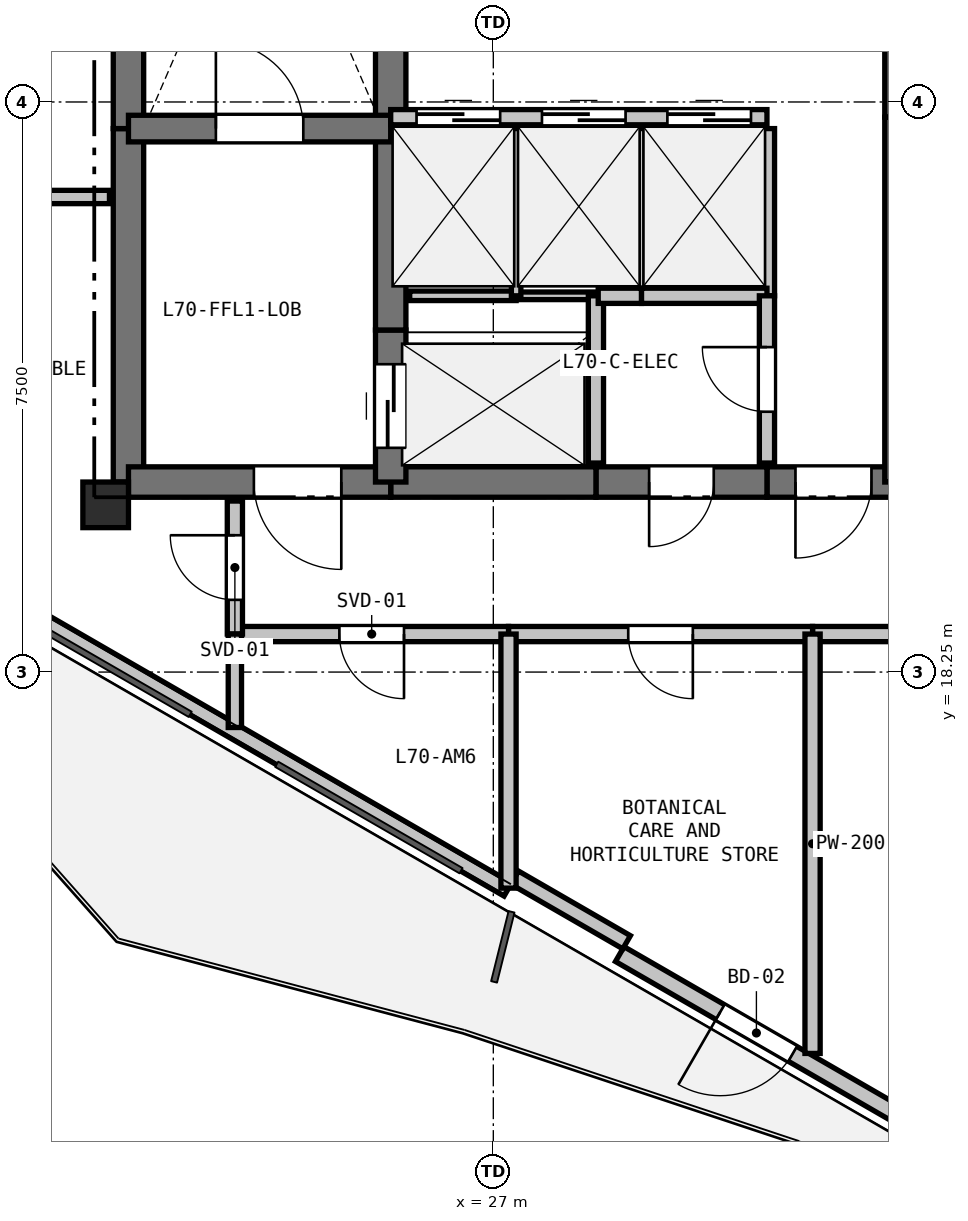
"""IFC4 building model, lengths in metres.
Left out: names, types, materials, properties, quantities, classifications, styles, units other than length and angle.
Written with IfcOpenShell. Run it as: python <this file> out.ifc"""

import sys

from ifc_helpers import new_model, si_unit, direction, frame, frame_2d, origin, origin_2d, place, context, subcontext, project, spatial, rectangle, extrude, element, fill, save


model = new_model("IFC4")
c1 = context("Model", 3, precision=1e-05, world=origin(), true_north=direction((0.0, 1.0)))
c2 = subcontext(c1, "Body", "Model", "MODEL_VIEW")
j1 = project(units=[si_unit("LENGTHUNIT", "METRE"), si_unit("PLANEANGLEUNIT", "RADIAN")], contexts=[c1])
p1 = place(None, origin())
s1 = spatial("IfcSite", under=j1, at=p1, CompositionType="ELEMENT")
p2 = place(p1, origin())
s2 = spatial("IfcBuilding", under=s1, at=p2, CompositionType="ELEMENT")
p3 = place(p2, frame((0.0, 0.0, 249.6)))
s3 = spatial("IfcBuildingStorey", under=s2, at=p3, CompositionType="ELEMENT", Elevation=249.6)
p4 = place(p3, frame((21.9, 20.45, 0.0), z_axis=(0.0, 0.0, 1.0), x_axis=(1.0, 0.0, 0.0)))
e1 = element("IfcColumn", 1, at=p4, inside=s3, PredefinedType="COLUMN", context=c2, shape_type="SweptSolid", body=[
    extrude(rectangle(XDim=0.6, YDim=0.6, at=origin_2d()), origin(), (0.0, 0.0, 1.0), 4.5),
])
p5 = place(p3, frame((36.395, 10.076, 0.0), z_axis=(0.0, 0.0, 1.0), x_axis=(-0.866026655105, 0.499997832642, 0.0)))
e2 = element("IfcWall", 2, at=p5, inside=s3, PredefinedType="SOLIDWALL", context=c2, shape_type="SweptSolid", body=[
    extrude(rectangle(XDim=8.928, YDim=0.225, at=frame_2d((4.464, 0.0))), origin(), (0.0, 0.0, 1.0), 3.84),
])
p6 = place(p5, frame((6.302, 0.0, 0.0)))
e3 = element("IfcOpeningElement", 3, at=p6, cuts=e2, PredefinedType="OPENING", context=c2, shape_type="SweptSolid", body=[
    extrude(rectangle(XDim=1.1, YDim=2.1, at=frame_2d((0.55, 1.05))), frame((0.0, 0.123, 0.0), z_axis=(0.0, -1.0, 0.0), x_axis=(1.0, 0.0, 0.0)), (0.0, 0.0, 1.0), 0.245),
])
p7 = place(p3, frame((27.191, 15.389, 0.0), z_axis=(0.0, 0.0, 1.0), x_axis=(-0.866019557082, 0.500010126649, 0.0)))
e4 = element("IfcWall", 4, at=p7, inside=s3, PredefinedType="PARAPET", context=c2, shape_type="SweptSolid", body=[
    extrude(rectangle(XDim=8.228, YDim=0.2, at=frame_2d((4.114, 0.0))), origin(), (0.0, 0.0, 1.0), 0.2),
])
p8 = place(p3, frame((28.754, 14.695, 0.0), z_axis=(0.0, 0.0, 1.0), x_axis=(-0.866025371046, 0.500000056704, 0.0)))
e5 = element("IfcWall", 5, at=p8, inside=s3, PredefinedType="PARAPET", context=c2, shape_type="SweptSolid", body=[
    extrude(rectangle(XDim=1.7, YDim=0.2, at=frame_2d((0.85, 0.0))), origin(), (0.0, 0.0, 1.0), 3.84),
])
p9 = place(p3, frame((22.2, 20.75, 0.0), z_axis=(0.0, 0.0, 1.0), x_axis=(0.0, 1.0, 0.0)))
e6 = element("IfcWall", 6, at=p9, inside=s3, PredefinedType="SHEAR", context=c2, shape_type="SweptSolid", body=[
    extrude(rectangle(XDim=4.65, YDim=0.4, at=frame_2d((2.325, 0.0))), origin(), (0.0, 0.0, 1.0), 4.22),
])
p10 = place(p3, frame((22.2, 25.4, 0.0), z_axis=(0.0, 0.0, 1.0), x_axis=(0.0, 1.0, 0.0)))
e7 = element("IfcWall", 7, at=p10, inside=s3, PredefinedType="SHEAR", context=c2, shape_type="SweptSolid", body=[
    extrude(rectangle(XDim=7.35, YDim=0.4, at=frame_2d((3.675, 0.0))), origin(), (0.0, 0.0, 1.0), 4.22),
])
p11 = place(p3, frame((32.35, 20.75, 0.0), z_axis=(0.0, 0.0, 1.0), x_axis=(-1.0, 0.0, 0.0)))
e8 = element("IfcWall", 8, at=p11, inside=s3, PredefinedType="SHEAR", context=c2, shape_type="SweptSolid", body=[
    extrude(rectangle(XDim=1.75, YDim=0.4, at=frame_2d((0.875, 0.0))), origin(), (0.0, 0.0, 1.0), 4.22),
])
p12 = place(p11, frame((0.375, 0.0, 0.0)))
e9 = element("IfcOpeningElement", 9, at=p12, cuts=e8, PredefinedType="OPENING", context=c2, shape_type="SweptSolid", body=[
    extrude(rectangle(XDim=1.0, YDim=2.15, at=frame_2d((0.5, 1.075))), frame((0.0, 0.21, 0.0), z_axis=(0.0, -1.0, 0.0), x_axis=(1.0, 0.0, 0.0)), (0.0, 0.0, 1.0), 0.42),
])
p13 = place(p3, frame((30.6, 20.75, 0.0), z_axis=(0.0, 0.0, 1.0), x_axis=(-1.0, 0.0, 0.0)))
e10 = element("IfcWall", 10, at=p13, inside=s3, PredefinedType="SHEAR", context=c2, shape_type="SweptSolid", body=[
    extrude(rectangle(XDim=2.25, YDim=0.4, at=frame_2d((1.125, 0.0))), origin(), (0.0, 0.0, 1.0), 4.22),
])
p14 = place(p13, frame((0.7, 0.0, 0.0)))
e11 = element("IfcOpeningElement", 11, at=p14, cuts=e10, PredefinedType="OPENING", context=c2, shape_type="SweptSolid", body=[
    extrude(rectangle(XDim=0.85, YDim=2.1, at=frame_2d((0.425, 1.05))), frame((0.0, 0.21, 0.0), z_axis=(0.0, -1.0, 0.0), x_axis=(1.0, 0.0, 0.0)), (0.0, 0.0, 1.0), 0.42),
])
p15 = place(p3, frame((28.35, 20.75, 0.0), z_axis=(0.0, 0.0, 1.0), x_axis=(-1.0, 0.0, 0.0)))
e12 = element("IfcWall", 12, at=p15, inside=s3, PredefinedType="SHEAR", context=c2, shape_type="SweptSolid", body=[
    extrude(rectangle(XDim=2.7, YDim=0.4, at=frame_2d((1.35, 0.0))), origin(), (0.0, 0.0, 1.0), 4.22),
])
p16 = place(p3, frame((25.65, 20.75, 0.0), z_axis=(0.0, 0.0, 1.0), x_axis=(-1.0, 0.0, 0.0)))
e13 = element("IfcWall", 13, at=p16, inside=s3, PredefinedType="SHEAR", context=c2, shape_type="SweptSolid", body=[
    extrude(rectangle(XDim=3.45, YDim=0.4, at=frame_2d((1.725, 0.0))), origin(), (0.0, 0.0, 1.0), 4.22),
])
p17 = place(p16, frame((0.65, 0.0, 0.0)))
e14 = element("IfcOpeningElement", 14, at=p17, cuts=e13, PredefinedType="OPENING", context=c2, shape_type="SweptSolid", body=[
    extrude(rectangle(XDim=1.15, YDim=2.15, at=frame_2d((0.575, 1.075))), frame((0.0, 0.21, 0.0), z_axis=(0.0, -1.0, 0.0), x_axis=(1.0, 0.0, 0.0)), (0.0, 0.0, 1.0), 0.42),
])
p18 = place(p3, frame((25.65, 20.75, 0.0), z_axis=(0.0, 0.0, 1.0), x_axis=(0.0, 1.0, 0.0)))
e15 = element("IfcWall", 15, at=p18, inside=s3, PredefinedType="SHEAR", context=c2, shape_type="SweptSolid", body=[
    extrude(rectangle(XDim=2.0, YDim=0.4, at=frame_2d((1.0, 0.0))), origin(), (0.0, 0.0, 1.0), 4.22),
])
p19 = place(p18, frame((0.45, 0.0, 0.0)))
e16 = element("IfcOpeningElement", 16, at=p19, cuts=e15, PredefinedType="OPENING", context=c2, shape_type="SweptSolid", body=[
    extrude(rectangle(XDim=1.1, YDim=2.15, at=frame_2d((0.55, 1.075))), frame((0.0, 0.21, 0.0), z_axis=(0.0, -1.0, 0.0), x_axis=(1.0, 0.0, 0.0)), (0.0, 0.0, 1.0), 0.42),
])
p20 = place(p3, frame((25.65, 22.75, 0.0), z_axis=(0.0, 0.0, 1.0), x_axis=(0.0, 1.0, 0.0)))
e17 = element("IfcWall", 17, at=p20, inside=s3, PredefinedType="SHEAR", context=c2, shape_type="SweptSolid", body=[
    extrude(rectangle(XDim=2.8, YDim=0.4, at=frame_2d((1.4, 0.0))), origin(), (0.0, 0.0, 1.0), 4.22),
])
p21 = place(p3, frame((25.65, 25.55, 0.0), z_axis=(0.0, 0.0, 1.0), x_axis=(0.0, 1.0, 0.0)))
e18 = element("IfcWall", 18, at=p21, inside=s3, PredefinedType="SHEAR", context=c2, shape_type="SweptSolid", body=[
    extrude(rectangle(XDim=2.4, YDim=0.4, at=frame_2d((1.2, 0.0))), origin(), (0.0, 0.0, 1.0), 4.22),
])
p22 = place(p3, frame((32.35, 20.75, 0.0), z_axis=(0.0, 0.0, 1.0), x_axis=(0.0, 1.0, 0.0)))
e19 = element("IfcWall", 19, at=p22, inside=s3, PredefinedType="SHEAR", context=c2, shape_type="SweptSolid", body=[
    extrude(rectangle(XDim=4.8, YDim=0.4, at=frame_2d((2.4, 0.0))), origin(), (0.0, 0.0, 1.0), 4.22),
])
p23 = place(p3, frame((32.35, 25.55, 0.0), z_axis=(0.0, 0.0, 1.0), x_axis=(0.0, 1.0, 0.0)))
e20 = element("IfcWall", 20, at=p23, inside=s3, PredefinedType="SHEAR", context=c2, shape_type="SweptSolid", body=[
    extrude(rectangle(XDim=2.4, YDim=0.4, at=frame_2d((1.2, 0.0))), origin(), (0.0, 0.0, 1.0), 4.22),
])
p24 = place(p3, frame((22.2, 25.4, 0.0), z_axis=(0.0, 0.0, 1.0), x_axis=(1.0, 0.0, 0.0)))
e21 = element("IfcWall", 21, at=p24, inside=s3, PredefinedType="SHEAR", context=c2, shape_type="SweptSolid", body=[
    extrude(rectangle(XDim=3.45, YDim=0.35, at=frame_2d((1.725, 0.0))), origin(), (0.0, 0.0, 1.0), 4.22),
])
p25 = place(p24, frame((1.15, 0.0, 0.0)))
e22 = element("IfcOpeningElement", 22, at=p25, cuts=e21, PredefinedType="OPENING", context=c2, shape_type="SweptSolid", body=[
    extrude(rectangle(XDim=1.15, YDim=2.15, at=frame_2d((0.575, 1.075))), frame((0.0, 0.185, 0.0), z_axis=(0.0, -1.0, 0.0), x_axis=(1.0, 0.0, 0.0)), (0.0, 0.0, 1.0), 0.37),
])
p26 = place(p3, frame((25.65, 25.55, 0.0), z_axis=(0.0, 0.0, 1.0), x_axis=(1.0, 0.0, 0.0)))
e23 = element("IfcWall", 23, at=p26, inside=s3, PredefinedType="PARTITIONING", context=c2, shape_type="SweptSolid", body=[
    extrude(rectangle(XDim=4.95, YDim=0.2, at=frame_2d((2.475, 0.0))), origin(), (0.0, 0.0, 1.0), 4.22),
])
p27 = place(p26, frame((0.34, 0.0, 0.0)))
e24 = element("IfcOpeningElement", 24, at=p27, cuts=e23, PredefinedType="OPENING", context=c2, shape_type="SweptSolid", body=[
    extrude(rectangle(XDim=1.1, YDim=2.15, at=frame_2d((0.55, 1.075))), frame((0.0, 0.11, 0.0), z_axis=(0.0, -1.0, 0.0), x_axis=(1.0, 0.0, 0.0)), (0.0, 0.0, 1.0), 0.22),
])
p28 = place(p26, frame((1.99, 0.0, 0.0)))
e25 = element("IfcOpeningElement", 25, at=p28, cuts=e23, PredefinedType="OPENING", context=c2, shape_type="SweptSolid", body=[
    extrude(rectangle(XDim=1.1, YDim=2.15, at=frame_2d((0.55, 1.075))), frame((0.0, 0.11, 0.0), z_axis=(0.0, -1.0, 0.0), x_axis=(1.0, 0.0, 0.0)), (0.0, 0.0, 1.0), 0.22),
])
p29 = place(p26, frame((3.64, 0.0, 0.0)))
e26 = element("IfcOpeningElement", 26, at=p29, cuts=e23, PredefinedType="OPENING", context=c2, shape_type="SweptSolid", body=[
    extrude(rectangle(XDim=1.1, YDim=2.15, at=frame_2d((0.55, 1.075))), frame((0.0, 0.11, 0.0), z_axis=(0.0, -1.0, 0.0), x_axis=(1.0, 0.0, 0.0)), (0.0, 0.0, 1.0), 0.22),
])
p30 = place(p3, frame((25.9, 23.2, 0.0), z_axis=(0.0, 0.0, 1.0), x_axis=(1.0, 0.0, 0.0)))
e27 = element("IfcWall", 27, at=p30, inside=s3, PredefinedType="PARTITIONING", context=c2, shape_type="SweptSolid", body=[
    extrude(rectangle(XDim=1.4, YDim=0.125, at=frame_2d((0.7, 0.0))), origin(), (0.0, 0.0, 1.0), 4.22),
])
p31 = place(p3, frame((27.3, 23.2, 0.0), z_axis=(0.0, 0.0, 1.0), x_axis=(1.0, 0.0, 0.0)))
e28 = element("IfcWall", 28, at=p31, inside=s3, PredefinedType="PARTITIONING", context=c2, shape_type="SweptSolid", body=[
    extrude(rectangle(XDim=1.05, YDim=0.1, at=frame_2d((0.525, 0.0))), origin(), (0.0, 0.0, 1.0), 4.22),
])
p32 = place(p3, frame((28.35, 23.2, 0.0), z_axis=(0.0, 0.0, 1.0), x_axis=(0.0, -1.0, 0.0)))
e29 = element("IfcWall", 29, at=p32, inside=s3, PredefinedType="PARTITIONING", context=c2, shape_type="SweptSolid", body=[
    extrude(rectangle(XDim=2.2, YDim=0.2, at=frame_2d((1.1, 0.0))), origin(), (0.0, 0.0, 1.0), 4.22),
])
p33 = place(p3, frame((27.3, 25.4, 0.0), z_axis=(0.0, 0.0, 1.0), x_axis=(0.0, -1.0, 0.0)))
e30 = element("IfcWall", 30, at=p33, inside=s3, PredefinedType="PARTITIONING", context=c2, shape_type="SweptSolid", body=[
    extrude(rectangle(XDim=2.2, YDim=0.125, at=frame_2d((1.1, 0.0))), origin(), (0.0, 0.0, 1.0), 4.22),
])
p34 = place(p3, frame((28.95, 25.4, 0.0), z_axis=(0.0, 0.0, 1.0), x_axis=(0.0, -1.0, 0.0)))
e31 = element("IfcWall", 31, at=p34, inside=s3, PredefinedType="PARTITIONING", context=c2, shape_type="SweptSolid", body=[
    extrude(rectangle(XDim=2.2, YDim=0.1, at=frame_2d((1.1, 0.0))), origin(), (0.0, 0.0, 1.0), 4.22),
])
p35 = place(p3, frame((28.95, 23.2, 0.0), z_axis=(0.0, 0.0, 1.0), x_axis=(-1.0, 0.0, 0.0)))
e32 = element("IfcWall", 32, at=p35, inside=s3, PredefinedType="PARTITIONING", context=c2, shape_type="SweptSolid", body=[
    extrude(rectangle(XDim=0.57, YDim=0.2, at=frame_2d((0.285, 0.0))), origin(), (0.0, 0.0, 1.0), 4.22),
])
p36 = place(p3, frame((30.6, 25.4, 0.0), z_axis=(0.0, 0.0, 1.0), x_axis=(0.0, -1.0, 0.0)))
e33 = element("IfcWall", 33, at=p36, inside=s3, PredefinedType="PARTITIONING", context=c2, shape_type="SweptSolid", body=[
    extrude(rectangle(XDim=2.2, YDim=0.2, at=frame_2d((1.1, 0.0))), origin(), (0.0, 0.0, 1.0), 4.22),
])
p37 = place(p3, frame((30.6, 23.2, 0.0), z_axis=(0.0, 0.0, 1.0), x_axis=(-1.0, 0.0, 0.0)))
e34 = element("IfcWall", 34, at=p37, inside=s3, PredefinedType="PARTITIONING", context=c2, shape_type="SweptSolid", body=[
    extrude(rectangle(XDim=1.65, YDim=0.2, at=frame_2d((0.825, 0.0))), origin(), (0.0, 0.0, 1.0), 4.22),
])
p38 = place(p3, frame((30.6, 21.0, 0.0), z_axis=(0.0, 0.0, 1.0), x_axis=(0.0, 1.0, 0.0)))
e35 = element("IfcWall", 35, at=p38, inside=s3, PredefinedType="PARTITIONING", context=c2, shape_type="SweptSolid", body=[
    extrude(rectangle(XDim=2.2, YDim=0.2, at=frame_2d((1.1, 0.0))), origin(), (0.0, 0.0, 1.0), 4.22),
])
p39 = place(p38, frame((0.675, 0.0, 0.0)))
e36 = element("IfcOpeningElement", 36, at=p39, cuts=e35, PredefinedType="OPENING", context=c2, shape_type="SweptSolid", body=[
    extrude(rectangle(XDim=0.85, YDim=2.1, at=frame_2d((0.425, 1.05))), frame((0.0, 0.11, 0.0), z_axis=(0.0, -1.0, 0.0), x_axis=(1.0, 0.0, 0.0)), (0.0, 0.0, 1.0), 0.22),
])
p40 = place(p3, frame((38.45, 18.75, 0.0), z_axis=(0.0, 0.0, 1.0), x_axis=(-1.0, 0.0, 0.0)))
e37 = element("IfcWall", 37, at=p40, inside=s3, PredefinedType="PARTITIONING", context=c2, shape_type="SweptSolid", body=[
    extrude(rectangle(XDim=7.25, YDim=0.2, at=frame_2d((3.625, 0.0))), origin(), (0.0, 0.0, 1.0), 3.668),
])
p41 = place(p40, frame((3.125, 0.0, 0.0)))
e38 = element("IfcOpeningElement", 38, at=p41, cuts=e37, PredefinedType="OPENING", context=c2, shape_type="SweptSolid", body=[
    extrude(rectangle(XDim=1.0, YDim=2.15, at=frame_2d((0.5, 1.075))), frame((0.0, 0.11, 0.0), z_axis=(0.0, -1.0, 0.0), x_axis=(1.0, 0.0, 0.0)), (0.0, 0.0, 1.0), 0.22),
])
p42 = place(p3, frame((31.2, 18.75, 0.0), z_axis=(0.0, 0.0, 1.0), x_axis=(-1.0, 0.0, 0.0)))
e39 = element("IfcWall", 39, at=p42, inside=s3, PredefinedType="PARTITIONING", context=c2, shape_type="SweptSolid", body=[
    extrude(rectangle(XDim=4.0, YDim=0.2, at=frame_2d((2.0, 0.0))), origin(), (0.0, 0.0, 1.0), 4.22),
])
p43 = place(p42, frame((1.575, 0.0, 0.0)))
e40 = element("IfcOpeningElement", 40, at=p43, cuts=e39, PredefinedType="OPENING", context=c2, shape_type="SweptSolid", body=[
    extrude(rectangle(XDim=0.85, YDim=2.1, at=frame_2d((0.425, 1.05))), frame((0.0, 0.11, 0.0), z_axis=(0.0, -1.0, 0.0), x_axis=(1.0, 0.0, 0.0)), (0.0, 0.0, 1.0), 0.22),
])
p44 = place(p3, frame((27.2, 18.75, 0.0), z_axis=(0.0, 0.0, 1.0), x_axis=(-1.0, 0.0, 0.0)))
e41 = element("IfcWall", 41, at=p44, inside=s3, PredefinedType="PARTITIONING", context=c2, shape_type="SweptSolid", body=[
    extrude(rectangle(XDim=3.6, YDim=0.2, at=frame_2d((1.8, 0.0))), origin(), (0.0, 0.0, 1.0), 3.668),
])
p45 = place(p44, frame((1.375, 0.0, 0.0)))
e42 = element("IfcOpeningElement", 42, at=p45, cuts=e41, PredefinedType="OPENING", context=c2, shape_type="SweptSolid", body=[
    extrude(rectangle(XDim=0.85, YDim=2.1, at=frame_2d((0.425, 1.05))), frame((0.0, 0.11, 0.0), z_axis=(0.0, -1.0, 0.0), x_axis=(1.0, 0.0, 0.0)), (0.0, 0.0, 1.0), 0.22),
])
p46 = place(p3, frame((23.6, 18.75, 0.0), z_axis=(0.0, 0.0, 1.0), x_axis=(0.0, 1.0, 0.0)))
e43 = element("IfcWall", 43, at=p46, inside=s3, PredefinedType="PARTITIONING", context=c2, shape_type="SweptSolid", body=[
    extrude(rectangle(XDim=1.75, YDim=0.2, at=frame_2d((0.875, 0.0))), origin(), (0.0, 0.0, 1.0), 3.668),
])
p47 = place(p46, frame((0.45, 0.0, 0.0)))
e44 = element("IfcOpeningElement", 44, at=p47, cuts=e43, PredefinedType="OPENING", context=c2, shape_type="SweptSolid", body=[
    extrude(rectangle(XDim=0.85, YDim=2.1, at=frame_2d((0.425, 1.05))), frame((0.0, 0.11, 0.0), z_axis=(0.0, -1.0, 0.0), x_axis=(1.0, 0.0, 0.0)), (0.0, 0.0, 1.0), 0.22),
])
p48 = place(p3, frame((27.2, 18.75, 0.0), z_axis=(0.0, 0.0, 1.0), x_axis=(0.0, -1.0, 0.0)))
e45 = element("IfcWall", 45, at=p48, inside=s3, PredefinedType="PARTITIONING", context=c2, shape_type="SweptSolid", body=[
    extrude(rectangle(XDim=3.342, YDim=0.2, at=frame_2d((1.671, 0.0))), origin(), (0.0, 0.0, 1.0), 2.365),
])
p49 = place(p3, frame((23.6, 17.521, 0.0), z_axis=(0.0, 0.0, 1.0), x_axis=(0.0, 1.0, 0.0)))
e46 = element("IfcWall", 46, at=p49, inside=s3, PredefinedType="PLUMBINGWALL", context=c2, shape_type="SweptSolid", body=[
    extrude(rectangle(XDim=1.229, YDim=0.175, at=frame_2d((0.615, 0.0))), origin(), (0.0, 0.0, 1.0), 2.365),
])
p50 = place(p3, frame((17.17, 24.5, 0.0), z_axis=(0.0, 0.0, 1.0), x_axis=(1.0, 0.0, 0.0)))
e47 = element("IfcWall", 47, at=p50, inside=s3, PredefinedType="PLUMBINGWALL", context=c2, shape_type="SweptSolid", body=[
    extrude(rectangle(XDim=4.78, YDim=0.175, at=frame_2d((2.39, 0.0))), origin(), (0.0, 0.0, 1.0), 3.745),
])
p51 = place(p3, frame((31.2, 13.233, 0.0), z_axis=(0.0, 0.0, 1.0), x_axis=(0.0, 1.0, 0.0)))
e48 = element("IfcWall", 48, at=p51, inside=s3, PredefinedType="PARTITIONING", context=c2, shape_type="SweptSolid", body=[
    extrude(rectangle(XDim=5.517, YDim=0.2, at=frame_2d((2.759, 0.0))), origin(), (0.0, 0.0, 1.0), 2.365),
])
p52 = place(p6, origin())
e49 = element("IfcDoor", 49, at=p52, inside=s3, OperationType="SINGLE_SWING_RIGHT", PredefinedType="DOOR", context=c2, shape_type="SweptSolid", body=[
    extrude(rectangle(XDim=1.1, YDim=2.1, at=frame_2d((0.55, 1.05))), frame((0.0, 0.025, 0.0), z_axis=(0.0, -1.0, 0.0), x_axis=(1.0, 0.0, 0.0)), (0.0, 0.0, 1.0), 0.05),
])
fill(e3, e49)
p53 = place(p27, origin())
e50 = element("IfcDoor", 50, at=p53, inside=s3, OperationType="SLIDING_TO_LEFT", PredefinedType="DOOR", context=c2, shape_type="SweptSolid", body=[
    extrude(rectangle(XDim=1.1, YDim=2.15, at=frame_2d((0.55, 1.075))), frame((0.0, 0.025, 0.0), z_axis=(0.0, -1.0, 0.0), x_axis=(1.0, 0.0, 0.0)), (0.0, 0.0, 1.0), 0.05),
])
fill(e24, e50)
p54 = place(p28, origin())
e51 = element("IfcDoor", 51, at=p54, inside=s3, OperationType="SLIDING_TO_LEFT", PredefinedType="DOOR", context=c2, shape_type="SweptSolid", body=[
    extrude(rectangle(XDim=1.1, YDim=2.15, at=frame_2d((0.55, 1.075))), frame((0.0, 0.025, 0.0), z_axis=(0.0, -1.0, 0.0), x_axis=(1.0, 0.0, 0.0)), (0.0, 0.0, 1.0), 0.05),
])
fill(e25, e51)
p55 = place(p29, origin())
e52 = element("IfcDoor", 52, at=p55, inside=s3, OperationType="SLIDING_TO_LEFT", PredefinedType="DOOR", context=c2, shape_type="SweptSolid", body=[
    extrude(rectangle(XDim=1.1, YDim=2.15, at=frame_2d((0.55, 1.075))), frame((0.0, 0.025, 0.0), z_axis=(0.0, -1.0, 0.0), x_axis=(1.0, 0.0, 0.0)), (0.0, 0.0, 1.0), 0.05),
])
fill(e26, e52)
p56 = place(p12, origin())
e53 = element("IfcDoor", 53, at=p56, inside=s3, OperationType="SINGLE_SWING_RIGHT", PredefinedType="DOOR", context=c2, shape_type="SweptSolid", body=[
    extrude(rectangle(XDim=1.0, YDim=2.15, at=frame_2d((0.5, 1.075))), frame((0.0, 0.025, 0.0), z_axis=(0.0, -1.0, 0.0), x_axis=(1.0, 0.0, 0.0)), (0.0, 0.0, 1.0), 0.05),
])
fill(e9, e53)
p57 = place(p19, origin())
e54 = element("IfcDoor", 54, at=p57, inside=s3, OperationType="SLIDING_TO_LEFT", PredefinedType="DOOR", context=c2, shape_type="SweptSolid", body=[
    extrude(rectangle(XDim=1.1, YDim=2.15, at=frame_2d((0.55, 1.075))), frame((0.0, 0.025, 0.0), z_axis=(0.0, -1.0, 0.0), x_axis=(1.0, 0.0, 0.0)), (0.0, 0.0, 1.0), 0.05),
])
fill(e16, e54)
p58 = place(p25, origin())
e55 = element("IfcDoor", 55, at=p58, inside=s3, OperationType="SINGLE_SWING_LEFT", PredefinedType="DOOR", context=c2, shape_type="SweptSolid", body=[
    extrude(rectangle(XDim=1.15, YDim=2.15, at=frame_2d((0.575, 1.075))), frame((0.0, 0.025, 0.0), z_axis=(0.0, -1.0, 0.0), x_axis=(1.0, 0.0, 0.0)), (0.0, 0.0, 1.0), 0.05),
])
fill(e22, e55)
p59 = place(p17, origin())
e56 = element("IfcDoor", 56, at=p59, inside=s3, OperationType="SINGLE_SWING_LEFT", PredefinedType="DOOR", context=c2, shape_type="SweptSolid", body=[
    extrude(rectangle(XDim=1.15, YDim=2.15, at=frame_2d((0.575, 1.075))), frame((0.0, 0.025, 0.0), z_axis=(0.0, -1.0, 0.0), x_axis=(1.0, 0.0, 0.0)), (0.0, 0.0, 1.0), 0.05),
])
fill(e14, e56)
p60 = place(p39, origin())
e57 = element("IfcDoor", 57, at=p60, inside=s3, OperationType="SINGLE_SWING_RIGHT", PredefinedType="DOOR", context=c2, shape_type="SweptSolid", body=[
    extrude(rectangle(XDim=0.85, YDim=2.1, at=frame_2d((0.425, 1.05))), frame((0.0, 0.025, 0.0), z_axis=(0.0, -1.0, 0.0), x_axis=(1.0, 0.0, 0.0)), (0.0, 0.0, 1.0), 0.05),
])
fill(e36, e57)
p61 = place(p45, origin())
e58 = element("IfcDoor", 58, at=p61, inside=s3, OperationType="SINGLE_SWING_LEFT", PredefinedType="DOOR", context=c2, shape_type="SweptSolid", body=[
    extrude(rectangle(XDim=0.85, YDim=2.1, at=frame_2d((0.425, 1.05))), frame((0.0, 0.025, 0.0), z_axis=(0.0, -1.0, 0.0), x_axis=(1.0, 0.0, 0.0)), (0.0, 0.0, 1.0), 0.05),
])
fill(e42, e58)
p62 = place(p47, origin())
e59 = element("IfcDoor", 59, at=p62, inside=s3, OperationType="SINGLE_SWING_RIGHT", PredefinedType="DOOR", context=c2, shape_type="SweptSolid", body=[
    extrude(rectangle(XDim=0.85, YDim=2.1, at=frame_2d((0.425, 1.05))), frame((0.0, 0.025, 0.0), z_axis=(0.0, -1.0, 0.0), x_axis=(1.0, 0.0, 0.0)), (0.0, 0.0, 1.0), 0.05),
])
fill(e44, e59)
p63 = place(p14, origin())
e60 = element("IfcDoor", 60, at=p63, inside=s3, OperationType="SINGLE_SWING_RIGHT", PredefinedType="DOOR", context=c2, shape_type="SweptSolid", body=[
    extrude(rectangle(XDim=0.85, YDim=2.1, at=frame_2d((0.425, 1.05))), frame((0.0, 0.025, 0.0), z_axis=(0.0, -1.0, 0.0), x_axis=(1.0, 0.0, 0.0)), (0.0, 0.0, 1.0), 0.05),
])
fill(e11, e60)
p64 = place(p43, origin())
e61 = element("IfcDoor", 61, at=p64, inside=s3, OperationType="SINGLE_SWING_LEFT", PredefinedType="DOOR", context=c2, shape_type="SweptSolid", body=[
    extrude(rectangle(XDim=0.85, YDim=2.1, at=frame_2d((0.425, 1.05))), frame((0.0, 0.025, 0.0), z_axis=(0.0, -1.0, 0.0), x_axis=(1.0, 0.0, 0.0)), (0.0, 0.0, 1.0), 0.05),
])
fill(e40, e61)
save(model, sys.argv[1])
